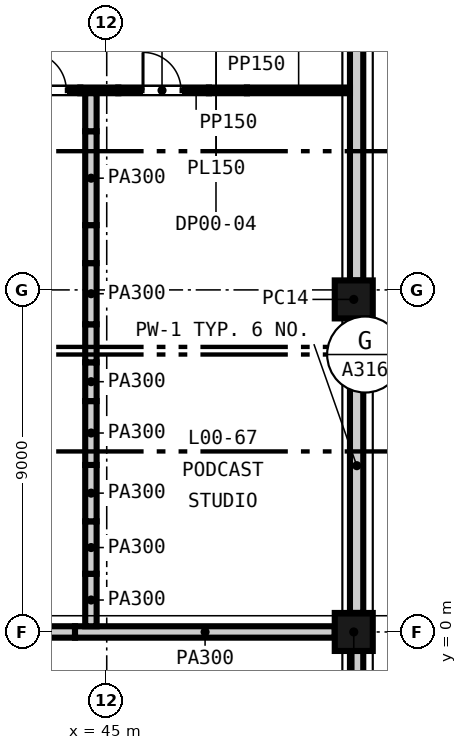
"""IFC4 building model, lengths in metres.
Left out: names, types, materials, properties, quantities, classifications, styles, units other than length and angle.
Written with IfcOpenShell. Run it as: python <this file> out.ifc"""

import sys

from ifc_helpers import new_model, si_unit, direction, frame, frame_2d, origin, origin_2d, place, context, subcontext, project, spatial, rectangle, extrude, element, fill, save


model = new_model("IFC4")
c1 = context("Model", 3, precision=1e-05, world=origin(), true_north=direction((0.0, 1.0)))
c2 = subcontext(c1, "Body", "Model", "MODEL_VIEW")
j1 = project(units=[si_unit("LENGTHUNIT", "METRE"), si_unit("PLANEANGLEUNIT", "RADIAN")], contexts=[c1])
p1 = place(None, origin())
s1 = spatial("IfcSite", under=j1, at=p1, CompositionType="ELEMENT")
p2 = place(p1, origin())
s2 = spatial("IfcBuilding", under=s1, at=p2, CompositionType="ELEMENT")
p3 = place(p2, origin())
s3 = spatial("IfcBuildingStorey", under=s2, at=p3, CompositionType="ELEMENT", Elevation=0.0)
for number, where, z_axis, x_axis in (
    (1, (51.5, 0.0, -0.3), (0.0, 0.0, 1.0), (0.0, 1.0, 0.0)),
    (2, (51.5, 8.75, -0.3), (0.0, 0.0, 1.0), (0.0, 1.0, 0.0)),
):
    element("IfcColumn", number, at=place(p3, frame(where, z_axis=z_axis, x_axis=x_axis)), inside=s3, PredefinedType="COLUMN", context=c2, shape_type="SweptSolid", body=[
        extrude(rectangle(XDim=1.0, YDim=1.0, at=origin_2d()), origin(), (0.0, 0.0, 1.0), 8.9),
    ])
p4 = place(p3, frame((51.575, -8.2, -0.3), z_axis=(0.0, 0.0, 1.0), x_axis=(0.0, 1.0, 0.0)))
e3 = element("IfcWall", 3, at=p4, inside=s3, PredefinedType="SOLIDWALL", context=c2, shape_type="SweptSolid", body=[
    extrude(rectangle(XDim=7.7, YDim=0.35, at=frame_2d((3.85, 0.0))), origin(), (0.0, 0.0, 1.0), 8.0),
])
for number, where, z_axis, x_axis in (
    (4, (51.575, 0.5, -0.3), (0.0, 0.0, 1.0), (0.0, 1.0, 0.0)),
    (5, (51.575, 9.25, -0.3), (0.0, 0.0, 1.0), (0.0, 1.0, 0.0)),
):
    element("IfcWall", number, at=place(p3, frame(where, z_axis=z_axis, x_axis=x_axis)), inside=s3, PredefinedType="SOLIDWALL", context=c2, shape_type="SweptSolid", body=[
        extrude(rectangle(XDim=7.75, YDim=0.35, at=frame_2d((3.875, 0.0))), origin(), (0.0, 0.0, 1.0), 8.0),
    ])
p5 = place(p3, frame((31.15, 0.0, 0.0), z_axis=(0.0, 0.0, 1.0), x_axis=(1.0, 0.0, 0.0)))
e6 = element("IfcWall", 6, at=p5, inside=s3, PredefinedType="PARTITIONING", context=c2, shape_type="SweptSolid", body=[
    extrude(rectangle(XDim=13.016, YDim=0.3, at=frame_2d((6.508, 0.0))), origin(), (0.0, 0.0, 1.0), 7.6),
])
p6 = place(p3, frame((44.166, 0.0, 0.0), z_axis=(0.0, 0.0, 1.0), x_axis=(1.0, 0.0, 0.0)))
e7 = element("IfcWall", 7, at=p6, inside=s3, PredefinedType="PARTITIONING", context=c2, shape_type="SweptSolid", body=[
    extrude(rectangle(XDim=6.834, YDim=0.3, at=frame_2d((3.417, 0.0))), origin(), (0.0, 0.0, 1.0), 8.6),
])
p7 = place(p3, frame((42.536, 14.25, 0.0), z_axis=(0.0, 0.0, 1.0), x_axis=(1.0, 0.0, 0.0)))
e8 = element("IfcWall", 8, at=p7, inside=s3, PredefinedType="PARTITIONING", context=c2, shape_type="SweptSolid", body=[
    extrude(rectangle(XDim=1.769, YDim=0.15, at=frame_2d((0.884, 0.0))), origin(), (0.0, 0.0, 1.0), 8.6),
])
p8 = place(p7, frame((0.4, 0.0, 0.0)))
e9 = element("IfcOpeningElement", 9, at=p8, cuts=e8, PredefinedType="OPENING", context=c2, shape_type="SweptSolid", body=[
    extrude(rectangle(XDim=1.0, YDim=2.1, at=frame_2d((0.5, 1.05))), frame((0.0, 0.085, 0.0), z_axis=(0.0, -1.0, 0.0), x_axis=(1.0, 0.0, 0.0)), (0.0, 0.0, 1.0), 0.17),
])
p9 = place(p3, frame((44.305, 14.25, 0.0), z_axis=(0.0, 0.0, 1.0), x_axis=(1.0, 0.0, 0.0)))
e10 = element("IfcWall", 10, at=p9, inside=s3, PredefinedType="PARTITIONING", context=c2, shape_type="SweptSolid", body=[
    extrude(rectangle(XDim=1.0, YDim=0.15, at=frame_2d((0.5, 0.0))), origin(), (0.0, 0.0, 1.0), 7.511),
])
p10 = place(p3, frame((45.305, 14.25, 0.0), z_axis=(0.0, 0.0, 1.0), x_axis=(1.0, 0.0, 0.0)))
e11 = element("IfcWall", 11, at=p10, inside=s3, PredefinedType="PARTITIONING", context=c2, shape_type="SweptSolid", body=[
    extrude(rectangle(XDim=2.384, YDim=0.15, at=frame_2d((1.192, 0.0))), origin(), (0.0, 0.0, 1.0), 8.6),
])
p11 = place(p10, frame((0.65, 0.0, 0.0)))
e12 = element("IfcOpeningElement", 12, at=p11, cuts=e11, PredefinedType="OPENING", context=c2, shape_type="SweptSolid", body=[
    extrude(rectangle(XDim=1.0, YDim=2.1, at=frame_2d((0.5, 1.05))), frame((0.0, 0.085, 0.0), z_axis=(0.0, -1.0, 0.0), x_axis=(1.0, 0.0, 0.0)), (0.0, 0.0, 1.0), 0.17),
])
p12 = place(p3, frame((47.689, 14.25, 0.0), z_axis=(0.0, 0.0, 1.0), x_axis=(1.0, 0.0, 0.0)))
e13 = element("IfcWall", 13, at=p12, inside=s3, PredefinedType="PARTITIONING", context=c2, shape_type="SweptSolid", body=[
    extrude(rectangle(XDim=1.0, YDim=0.15, at=frame_2d((0.5, 0.0))), origin(), (0.0, 0.0, 1.0), 7.686),
])
p13 = place(p3, frame((48.689, 14.25, 0.0), z_axis=(0.0, 0.0, 1.0), x_axis=(1.0, 0.0, 0.0)))
e14 = element("IfcWall", 14, at=p13, inside=s3, PredefinedType="PARTITIONING", context=c2, shape_type="SweptSolid", body=[
    extrude(rectangle(XDim=2.711, YDim=0.15, at=frame_2d((1.355, 0.0))), origin(), (0.0, 0.0, 1.0), 8.6),
])
p14 = place(p3, frame((44.584, 0.15, 0.0), z_axis=(0.0, 0.0, 1.0), x_axis=(0.0, 1.0, 0.0)))
e15 = element("IfcWall", 15, at=p14, inside=s3, PredefinedType="PARTITIONING", context=c2, shape_type="SweptSolid", body=[
    extrude(rectangle(XDim=1.381, YDim=0.3, at=frame_2d((0.691, 0.0))), origin(), (0.0, 0.0, 1.0), 7.841),
])
p15 = place(p3, frame((44.584, 1.531, 0.0), z_axis=(0.0, 0.0, 1.0), x_axis=(0.0, 1.0, 0.0)))
e16 = element("IfcWall", 16, at=p15, inside=s3, PredefinedType="PARTITIONING", context=c2, shape_type="SweptSolid", body=[
    extrude(rectangle(XDim=1.38, YDim=0.3, at=frame_2d((0.69, 0.0))), origin(), (0.0, 0.0, 1.0), 7.841),
])
p16 = place(p3, frame((44.584, 2.911, 0.0), z_axis=(0.0, 0.0, 1.0), x_axis=(0.0, 1.0, 0.0)))
e17 = element("IfcWall", 17, at=p16, inside=s3, PredefinedType="PARTITIONING", context=c2, shape_type="SweptSolid", body=[
    extrude(rectangle(XDim=1.483, YDim=0.3, at=frame_2d((0.742, 0.0))), origin(), (0.0, 0.0, 1.0), 7.841),
])
p17 = place(p3, frame((44.584, 4.394, 0.0), z_axis=(0.0, 0.0, 1.0), x_axis=(0.0, 1.0, 0.0)))
e18 = element("IfcWall", 18, at=p17, inside=s3, PredefinedType="PARTITIONING", context=c2, shape_type="SweptSolid", body=[
    extrude(rectangle(XDim=1.68, YDim=0.3, at=frame_2d((0.84, 0.0))), origin(), (0.0, 0.0, 1.0), 7.765),
])
p18 = place(p3, frame((44.584, 6.075, 0.0), z_axis=(0.0, 0.0, 1.0), x_axis=(0.0, 1.0, 0.0)))
e19 = element("IfcWall", 19, at=p18, inside=s3, PredefinedType="PARTITIONING", context=c2, shape_type="SweptSolid", body=[
    extrude(rectangle(XDim=1.02, YDim=0.3, at=frame_2d((0.51, 0.0))), origin(), (0.0, 0.0, 1.0), 8.6),
])
p19 = place(p3, frame((44.584, 7.095, 0.0), z_axis=(0.0, 0.0, 1.0), x_axis=(0.0, 1.0, 0.0)))
e20 = element("IfcWall", 20, at=p19, inside=s3, PredefinedType="PARTITIONING", context=c2, shape_type="SweptSolid", body=[
    extrude(rectangle(XDim=1.0, YDim=0.3, at=frame_2d((0.5, 0.0))), origin(), (0.0, 0.0, 1.0), 7.698),
])
p20 = place(p3, frame((44.584, 8.095, 0.0), z_axis=(0.0, 0.0, 1.0), x_axis=(0.0, 1.0, 0.0)))
e21 = element("IfcWall", 21, at=p20, inside=s3, PredefinedType="PARTITIONING", context=c2, shape_type="SweptSolid", body=[
    extrude(rectangle(XDim=1.61, YDim=0.3, at=frame_2d((0.805, 0.0))), origin(), (0.0, 0.0, 1.0), 8.6),
])
p21 = place(p3, frame((44.584, 9.705, 0.0), z_axis=(0.0, 0.0, 1.0), x_axis=(0.0, 1.0, 0.0)))
e22 = element("IfcWall", 22, at=p21, inside=s3, PredefinedType="PARTITIONING", context=c2, shape_type="SweptSolid", body=[
    extrude(rectangle(XDim=1.0, YDim=0.3, at=frame_2d((0.5, 0.0))), origin(), (0.0, 0.0, 1.0), 7.686),
])
p22 = place(p3, frame((44.584, 10.705, 0.0), z_axis=(0.0, 0.0, 1.0), x_axis=(0.0, 1.0, 0.0)))
e23 = element("IfcWall", 23, at=p22, inside=s3, PredefinedType="PARTITIONING", context=c2, shape_type="SweptSolid", body=[
    extrude(rectangle(XDim=2.47, YDim=0.3, at=frame_2d((1.235, 0.0))), origin(), (0.0, 0.0, 1.0), 8.6),
])
p23 = place(p3, frame((44.584, 13.175, 0.0), z_axis=(0.0, 0.0, 1.0), x_axis=(0.0, 1.0, 0.0)))
e24 = element("IfcWall", 24, at=p23, inside=s3, PredefinedType="PARTITIONING", context=c2, shape_type="SweptSolid", body=[
    extrude(rectangle(XDim=1.0, YDim=0.3, at=frame_2d((0.5, 0.0))), origin(), (0.0, 0.0, 1.0), 7.511),
])
p24 = place(p8, origin())
e25 = element("IfcDoor", 25, at=p24, inside=s3, OperationType="SINGLE_SWING_LEFT", PredefinedType="DOOR", context=c2, shape_type="SweptSolid", body=[
    extrude(rectangle(XDim=1.0, YDim=2.1, at=frame_2d((0.5, 1.05))), frame((0.0, 0.025, 0.0), z_axis=(0.0, -1.0, 0.0), x_axis=(1.0, 0.0, 0.0)), (0.0, 0.0, 1.0), 0.05),
])
fill(e9, e25)
p25 = place(p11, origin())
e26 = element("IfcDoor", 26, at=p25, inside=s3, OperationType="SINGLE_SWING_LEFT", PredefinedType="DOOR", context=c2, shape_type="SweptSolid", body=[
    extrude(rectangle(XDim=1.0, YDim=2.1, at=frame_2d((0.5, 1.05))), frame((0.0, 0.025, 0.0), z_axis=(0.0, -1.0, 0.0), x_axis=(1.0, 0.0, 0.0)), (0.0, 0.0, 1.0), 0.05),
])
fill(e12, e26)
save(model, sys.argv[1])
